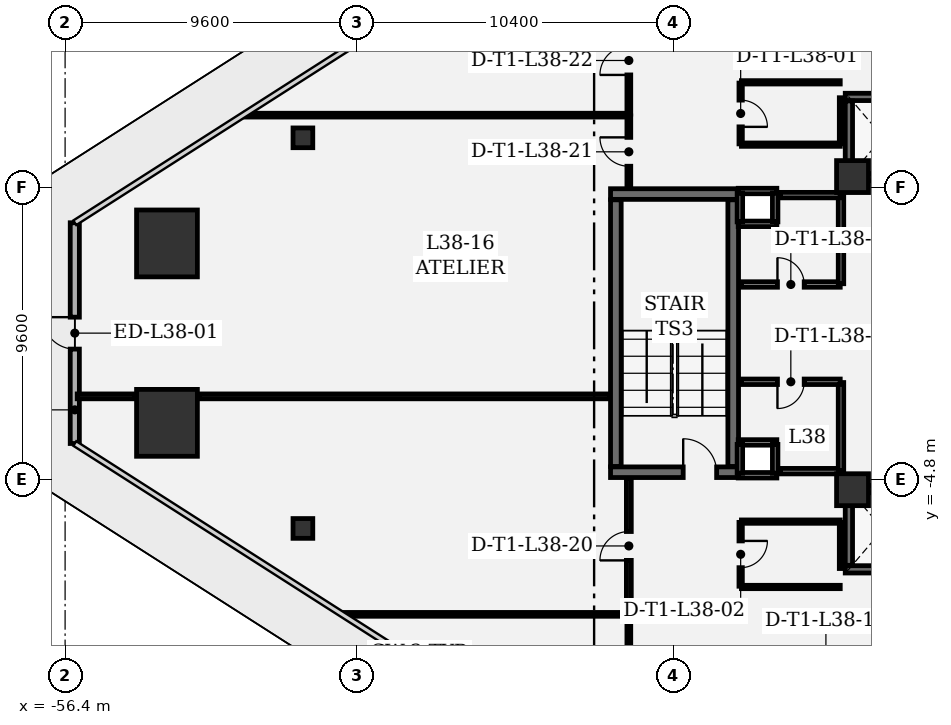
"""IFC4 building model, lengths in metres.
Left out: names, types, materials, properties, quantities, classifications, styles, units other than length and angle.
Written with IfcOpenShell. Run it as: python <this file> out.ifc"""

import sys

from ifc_helpers import new_model, si_unit, direction, frame, frame_2d, origin, origin_2d, place, context, subcontext, project, spatial, rectangle, extrude, element, fill, save


model = new_model("IFC4")
c1 = context("Model", 3, precision=1e-05, world=origin(), true_north=direction((0.0, 1.0)))
c2 = subcontext(c1, "Body", "Model", "MODEL_VIEW")
j1 = project(units=[si_unit("LENGTHUNIT", "METRE"), si_unit("PLANEANGLEUNIT", "RADIAN")], contexts=[c1])
p1 = place(None, origin())
s1 = spatial("IfcSite", under=j1, at=p1, CompositionType="ELEMENT")
p2 = place(p1, origin())
s2 = spatial("IfcBuilding", under=s1, at=p2, CompositionType="ELEMENT")
p3 = place(p2, frame((0.0, 0.0, 166.5)))
s3 = spatial("IfcBuildingStorey", under=s2, at=p3, CompositionType="ELEMENT", Elevation=166.5)
for number, where, z_axis, x_axis in (
    (1, (-53.049, 2.951, 0.0), (0.0, 0.0, 1.0), (1.0, 0.0, 0.0)),
    (2, (-53.049, -2.951, 0.0), (0.0, 0.0, 1.0), (1.0, 0.0, 0.0)),
):
    element("IfcColumn", number, at=place(p3, frame(where, z_axis=z_axis, x_axis=x_axis)), inside=s3, PredefinedType="COLUMN", context=c2, shape_type="SweptSolid", body=[
        extrude(rectangle(XDim=2.0, YDim=2.2, at=origin_2d()), origin(), (0.0, 0.0, 1.0), 4.05),
    ])
for number, where, z_axis, x_axis in (
    (3, (-30.5, 5.15, 0.0), (0.0, 0.0, 1.0), (1.0, 0.0, 0.0)),
    (4, (-30.5, -5.15, 0.0), (0.0, 0.0, 1.0), (1.0, 0.0, 0.0)),
):
    element("IfcColumn", number, at=place(p3, frame(where, z_axis=z_axis, x_axis=x_axis)), inside=s3, PredefinedType="COLUMN", context=c2, shape_type="SweptSolid", body=[
        extrude(rectangle(XDim=1.05, YDim=1.05, at=origin_2d()), origin(), (0.0, 0.0, 1.0), 4.05),
    ])
for number, where, z_axis, x_axis in (
    (5, (-48.578, 6.425, 0.0), (0.0, 0.0, 1.0), (1.0, 0.0, 0.0)),
    (6, (-48.578, -6.425, 0.0), (0.0, 0.0, 1.0), (1.0, 0.0, 0.0)),
):
    element("IfcColumn", number, at=place(p3, frame(where, z_axis=z_axis, x_axis=x_axis)), inside=s3, PredefinedType="COLUMN", context=c2, shape_type="SweptSolid", body=[
        extrude(rectangle(XDim=0.65, YDim=0.65, at=origin_2d()), origin(), (0.0, 0.0, 1.0), 4.05),
    ])
p4 = place(p3, frame((-56.081, -3.631, 0.0), z_axis=(0.0, 0.0, 1.0), x_axis=(0.0, 1.0, 0.0)))
e7 = element("IfcWall", 7, at=p4, inside=s3, PredefinedType="SOLIDWALL", context=c2, shape_type="SweptSolid", body=[
    extrude(rectangle(XDim=7.261, YDim=0.3, at=frame_2d((3.631, 0.0))), origin(), (0.0, 0.0, 1.0), 3.78),
])
p5 = place(p4, frame((3.106, 0.0, 0.0)))
e8 = element("IfcOpeningElement", 8, at=p5, cuts=e7, PredefinedType="OPENING", context=c2, shape_type="SweptSolid", body=[
    extrude(rectangle(XDim=1.05, YDim=2.2, at=frame_2d((0.525, 1.1))), frame((0.0, 0.16, 0.0), z_axis=(0.0, -1.0, 0.0), x_axis=(1.0, 0.0, 0.0)), (0.0, 0.0, 1.0), 0.32),
])
p6 = place(p3, frame((-38.46, -4.575, 0.0), z_axis=(0.0, 0.0, 1.0), x_axis=(1.0, 0.0, 0.0)))
e9 = element("IfcWall", 9, at=p6, inside=s3, PredefinedType="SHEAR", context=c2, shape_type="SweptSolid", body=[
    extrude(rectangle(XDim=4.21, YDim=0.35, at=frame_2d((2.105, 0.0))), origin(), (0.0, 0.0, 1.0), 3.78),
])
p7 = place(p6, frame((2.39, 0.0, 0.0)))
e10 = element("IfcOpeningElement", 10, at=p7, cuts=e9, PredefinedType="OPENING", context=c2, shape_type="SweptSolid", body=[
    extrude(rectangle(XDim=1.1, YDim=2.2, at=frame_2d((0.55, 1.1))), frame((0.0, 0.185, 0.0), z_axis=(0.0, -1.0, 0.0), x_axis=(1.0, 0.0, 0.0)), (0.0, 0.0, 1.0), 0.37),
])
p8 = place(p3, frame((-34.25, 4.575, 0.0), z_axis=(0.0, 0.0, 1.0), x_axis=(-1.0, 0.0, 0.0)))
e11 = element("IfcWall", 11, at=p8, inside=s3, PredefinedType="SHEAR", context=c2, shape_type="SweptSolid", body=[
    extrude(rectangle(XDim=4.21, YDim=0.35, at=frame_2d((2.105, 0.0))), origin(), (0.0, 0.0, 1.0), 3.78),
])
for number, where, z_axis, x_axis in (
    (12, (-34.425, -4.385, 0.0), (0.0, 0.0, 1.0), (0.0, 1.0, 0.0)),
    (13, (-38.285, 4.385, 0.0), (0.0, 0.0, 1.0), (0.0, -1.0, 0.0)),
):
    element("IfcWall", number, at=place(p3, frame(where, z_axis=z_axis, x_axis=x_axis)), inside=s3, PredefinedType="SHEAR", context=c2, shape_type="SweptSolid", body=[
        extrude(rectangle(XDim=8.77, YDim=0.35, at=frame_2d((4.385, 0.0))), origin(), (0.0, 0.0, 1.0), 3.78),
    ])
for number, where, z_axis, x_axis in (
    (14, (-28.26, 5.13, 0.0), (0.0, 0.0, 1.0), (-1.0, 0.0, 0.0)),
    (15, (-30.74, 7.77, 0.0), (0.0, 0.0, 1.0), (1.0, 0.0, 0.0)),
):
    element("IfcWall", number, at=place(p3, frame(where, z_axis=z_axis, x_axis=x_axis)), inside=s3, PredefinedType="SHEAR", context=c2, shape_type="SweptSolid", body=[
        extrude(rectangle(XDim=2.48, YDim=0.24, at=frame_2d((1.24, 0.0))), origin(), (0.0, 0.0, 1.0), 3.78),
    ])
p9 = place(p3, frame((-30.62, 5.262, 0.0), z_axis=(0.0, 0.0, 1.0), x_axis=(0.0, 1.0, 0.0)))
e16 = element("IfcWall", 16, at=p9, inside=s3, PredefinedType="SHEAR", context=c2, shape_type="SweptSolid", body=[
    extrude(rectangle(XDim=2.376, YDim=0.24, at=frame_2d((1.188, 0.0))), origin(), (0.0, 0.0, 1.0), 3.78),
])
for number, where, z_axis, x_axis in (
    (17, (-28.26, -7.77, 0.0), (0.0, 0.0, 1.0), (-1.0, 0.0, 0.0)),
    (18, (-30.74, -5.13, 0.0), (0.0, 0.0, 1.0), (1.0, 0.0, 0.0)),
):
    element("IfcWall", number, at=place(p3, frame(where, z_axis=z_axis, x_axis=x_axis)), inside=s3, PredefinedType="SHEAR", context=c2, shape_type="SweptSolid", body=[
        extrude(rectangle(XDim=2.48, YDim=0.24, at=frame_2d((1.24, 0.0))), origin(), (0.0, 0.0, 1.0), 3.78),
    ])
p10 = place(p3, frame((-30.62, -7.638, 0.0), z_axis=(0.0, 0.0, 1.0), x_axis=(0.0, 1.0, 0.0)))
e19 = element("IfcWall", 19, at=p10, inside=s3, PredefinedType="SHEAR", context=c2, shape_type="SweptSolid", body=[
    extrude(rectangle(XDim=2.376, YDim=0.24, at=frame_2d((1.188, 0.0))), origin(), (0.0, 0.0, 1.0), 3.78),
])
for number, where, z_axis, x_axis in (
    (20, (-32.99, 3.595, 0.0), (0.0, 0.0, 1.0), (-1.0, 0.0, 0.0)),
    (21, (-34.26, 4.675, 0.0), (0.0, 0.0, 1.0), (1.0, 0.0, 0.0)),
):
    element("IfcWall", number, at=place(p3, frame(where, z_axis=z_axis, x_axis=x_axis)), inside=s3, PredefinedType="PARTITIONING", context=c2, shape_type="SweptSolid", body=[
        extrude(rectangle(XDim=1.27, YDim=0.18, at=frame_2d((0.635, 0.0))), origin(), (0.0, 0.0, 1.0), 3.78),
    ])
for number, where, z_axis, x_axis in (
    (22, (-34.205, 3.66, 0.0), (0.0, 0.0, 1.0), (0.0, 1.0, 0.0)),
    (23, (-33.045, 4.61, 0.0), (0.0, 0.0, 1.0), (0.0, -1.0, 0.0)),
):
    element("IfcWall", number, at=place(p3, frame(where, z_axis=z_axis, x_axis=x_axis)), inside=s3, PredefinedType="PARTITIONING", context=c2, shape_type="SweptSolid", body=[
        extrude(rectangle(XDim=0.95, YDim=0.18, at=frame_2d((0.475, 0.0))), origin(), (0.0, 0.0, 1.0), 3.78),
    ])
for number, where, z_axis, x_axis in (
    (24, (-32.99, -4.675, 0.0), (0.0, 0.0, 1.0), (-1.0, 0.0, 0.0)),
    (25, (-34.26, -3.595, 0.0), (0.0, 0.0, 1.0), (1.0, 0.0, 0.0)),
):
    element("IfcWall", number, at=place(p3, frame(where, z_axis=z_axis, x_axis=x_axis)), inside=s3, PredefinedType="PARTITIONING", context=c2, shape_type="SweptSolid", body=[
        extrude(rectangle(XDim=1.27, YDim=0.18, at=frame_2d((0.635, 0.0))), origin(), (0.0, 0.0, 1.0), 3.78),
    ])
for number, where, z_axis, x_axis in (
    (26, (-34.205, -4.61, 0.0), (0.0, 0.0, 1.0), (0.0, 1.0, 0.0)),
    (27, (-33.045, -3.66, 0.0), (0.0, 0.0, 1.0), (0.0, -1.0, 0.0)),
):
    element("IfcWall", number, at=place(p3, frame(where, z_axis=z_axis, x_axis=x_axis)), inside=s3, PredefinedType="PARTITIONING", context=c2, shape_type="SweptSolid", body=[
        extrude(rectangle(XDim=0.95, YDim=0.18, at=frame_2d((0.475, 0.0))), origin(), (0.0, 0.0, 1.0), 3.78),
    ])
p11 = place(p3, frame((-34.18, 8.225, 0.0), z_axis=(0.0, 0.0, 1.0), x_axis=(0.0, -1.0, 0.0)))
e28 = element("IfcWall", 28, at=p11, inside=s3, PredefinedType="PARTITIONING", context=c2, shape_type="SweptSolid", body=[
    extrude(rectangle(XDim=2.0, YDim=0.11, at=frame_2d((1.0, 0.0))), origin(), (0.0, 0.0, 1.0), 3.78),
])
p12 = place(p11, frame((0.56, 0.0, 0.0)))
e29 = element("IfcOpeningElement", 29, at=p12, cuts=e28, PredefinedType="OPENING", context=c2, shape_type="SweptSolid", body=[
    extrude(rectangle(XDim=0.88, YDim=2.1, at=frame_2d((0.44, 1.05))), frame((0.0, 0.065, 0.0), z_axis=(0.0, -1.0, 0.0), x_axis=(1.0, 0.0, 0.0)), (0.0, 0.0, 1.0), 0.13),
])
p13 = place(p3, frame((-34.155, 6.2, 0.0), z_axis=(0.0, 0.0, 1.0), x_axis=(1.0, 0.0, 0.0)))
e30 = element("IfcWall", 30, at=p13, inside=s3, PredefinedType="PARTITIONING", context=c2, shape_type="SweptSolid", body=[
    extrude(rectangle(XDim=3.25, YDim=0.11, at=frame_2d((1.625, 0.0))), origin(), (0.0, 0.0, 1.0), 3.344),
])
p14 = place(p3, frame((-30.88, 6.225, 0.0), z_axis=(0.0, 0.0, 1.0), x_axis=(0.0, 1.0, 0.0)))
e31 = element("IfcWall", 31, at=p14, inside=s3, PredefinedType="PARTITIONING", context=c2, shape_type="SweptSolid", body=[
    extrude(rectangle(XDim=1.518, YDim=0.11, at=frame_2d((0.759, 0.0))), origin(), (0.0, 0.0, 1.0), 3.78),
])
p15 = place(p3, frame((-30.905, 8.25, 0.0), z_axis=(0.0, 0.0, 1.0), x_axis=(-1.0, 0.0, 0.0)))
e32 = element("IfcWall", 32, at=p15, inside=s3, PredefinedType="PARTITIONING", context=c2, shape_type="SweptSolid", body=[
    extrude(rectangle(XDim=3.25, YDim=0.11, at=frame_2d((1.625, 0.0))), origin(), (0.0, 0.0, 1.0), 3.78),
])
p16 = place(p3, frame((-34.18, -6.225, 0.0), z_axis=(0.0, 0.0, 1.0), x_axis=(0.0, -1.0, 0.0)))
e33 = element("IfcWall", 33, at=p16, inside=s3, PredefinedType="PARTITIONING", context=c2, shape_type="SweptSolid", body=[
    extrude(rectangle(XDim=2.1, YDim=0.11, at=frame_2d((1.05, 0.0))), origin(), (0.0, 0.0, 1.0), 3.78),
])
p17 = place(p16, frame((0.61, 0.0, 0.0)))
e34 = element("IfcOpeningElement", 34, at=p17, cuts=e33, PredefinedType="OPENING", context=c2, shape_type="SweptSolid", body=[
    extrude(rectangle(XDim=0.88, YDim=2.1, at=frame_2d((0.44, 1.05))), frame((0.0, 0.065, 0.0), z_axis=(0.0, -1.0, 0.0), x_axis=(1.0, 0.0, 0.0)), (0.0, 0.0, 1.0), 0.13),
])
p18 = place(p3, frame((-34.155, -8.35, 0.0), z_axis=(0.0, 0.0, 1.0), x_axis=(1.0, 0.0, 0.0)))
e35 = element("IfcWall", 35, at=p18, inside=s3, PredefinedType="PARTITIONING", context=c2, shape_type="SweptSolid", body=[
    extrude(rectangle(XDim=3.25, YDim=0.11, at=frame_2d((1.625, 0.0))), origin(), (0.0, 0.0, 1.0), 3.78),
])
p19 = place(p3, frame((-30.88, -7.743, 0.0), z_axis=(0.0, 0.0, 1.0), x_axis=(0.0, 1.0, 0.0)))
e36 = element("IfcWall", 36, at=p19, inside=s3, PredefinedType="PARTITIONING", context=c2, shape_type="SweptSolid", body=[
    extrude(rectangle(XDim=1.518, YDim=0.11, at=frame_2d((0.759, 0.0))), origin(), (0.0, 0.0, 1.0), 3.78),
])
p20 = place(p3, frame((-30.905, -6.2, 0.0), z_axis=(0.0, 0.0, 1.0), x_axis=(-1.0, 0.0, 0.0)))
e37 = element("IfcWall", 37, at=p20, inside=s3, PredefinedType="PARTITIONING", context=c2, shape_type="SweptSolid", body=[
    extrude(rectangle(XDim=3.25, YDim=0.11, at=frame_2d((1.625, 0.0))), origin(), (0.0, 0.0, 1.0), 3.344),
])
p21 = place(p3, frame((-34.155, 1.6, 0.0), z_axis=(0.0, 0.0, 1.0), x_axis=(1.0, 0.0, 0.0)))
e38 = element("IfcWall", 38, at=p21, inside=s3, PredefinedType="PARTITIONING", context=c2, shape_type="SweptSolid", body=[
    extrude(rectangle(XDim=3.25, YDim=0.18, at=frame_2d((1.625, 0.0))), origin(), (0.0, 0.0, 1.0), 3.78),
])
p22 = place(p21, frame((1.185, 0.0, 0.0)))
e39 = element("IfcOpeningElement", 39, at=p22, cuts=e38, PredefinedType="OPENING", context=c2, shape_type="SweptSolid", body=[
    extrude(rectangle(XDim=0.88, YDim=2.1, at=frame_2d((0.44, 1.05))), frame((0.0, 0.1, 0.0), z_axis=(0.0, -1.0, 0.0), x_axis=(1.0, 0.0, 0.0)), (0.0, 0.0, 1.0), 0.2),
])
p23 = place(p3, frame((-30.88, 1.625, 0.0), z_axis=(0.0, 0.0, 1.0), x_axis=(0.0, 1.0, 0.0)))
e40 = element("IfcWall", 40, at=p23, inside=s3, PredefinedType="PARTITIONING", context=c2, shape_type="SweptSolid", body=[
    extrude(rectangle(XDim=2.89, YDim=0.18, at=frame_2d((1.445, 0.0))), origin(), (0.0, 0.0, 1.0), 3.78),
])
for number, where, z_axis, x_axis in (
    (41, (-30.905, 4.54, 0.0), (0.0, 0.0, 1.0), (-1.0, 0.0, 0.0)),
    (42, (-32.88, -4.54, 0.0), (0.0, 0.0, 1.0), (1.0, 0.0, 0.0)),
):
    element("IfcWall", number, at=place(p3, frame(where, z_axis=z_axis, x_axis=x_axis)), inside=s3, PredefinedType="PARTITIONING", context=c2, shape_type="SweptSolid", body=[
        extrude(rectangle(XDim=1.975, YDim=0.18, at=frame_2d((0.988, 0.0))), origin(), (0.0, 0.0, 1.0), 3.78),
    ])
p24 = place(p3, frame((-30.88, -4.515, 0.0), z_axis=(0.0, 0.0, 1.0), x_axis=(0.0, 1.0, 0.0)))
e43 = element("IfcWall", 43, at=p24, inside=s3, PredefinedType="PARTITIONING", context=c2, shape_type="SweptSolid", body=[
    extrude(rectangle(XDim=2.89, YDim=0.18, at=frame_2d((1.445, 0.0))), origin(), (0.0, 0.0, 1.0), 3.78),
])
p25 = place(p3, frame((-30.905, -1.6, 0.0), z_axis=(0.0, 0.0, 1.0), x_axis=(-1.0, 0.0, 0.0)))
e44 = element("IfcWall", 44, at=p25, inside=s3, PredefinedType="PARTITIONING", context=c2, shape_type="SweptSolid", body=[
    extrude(rectangle(XDim=3.25, YDim=0.18, at=frame_2d((1.625, 0.0))), origin(), (0.0, 0.0, 1.0), 3.78),
])
p26 = place(p25, frame((1.185, 0.0, 0.0)))
e45 = element("IfcOpeningElement", 45, at=p26, cuts=e44, PredefinedType="OPENING", context=c2, shape_type="SweptSolid", body=[
    extrude(rectangle(XDim=0.88, YDim=2.1, at=frame_2d((0.44, 1.05))), frame((0.0, 0.1, 0.0), z_axis=(0.0, -1.0, 0.0), x_axis=(1.0, 0.0, 0.0)), (0.0, 0.0, 1.0), 0.2),
])
p27 = place(p3, frame((-37.858, -10.933, 0.0), z_axis=(0.0, 0.0, 1.0), x_axis=(0.0, 1.0, 0.0)))
e46 = element("IfcWall", 46, at=p27, inside=s3, PredefinedType="PARTITIONING", context=c2, shape_type="SweptSolid", body=[
    extrude(rectangle(XDim=1.658, YDim=0.125, at=frame_2d((0.829, 0.0))), origin(), (0.0, 0.0, 1.0), 3.78),
])
p28 = place(p3, frame((-37.883, -9.25, 0.0), z_axis=(0.0, 0.0, 1.0), x_axis=(-1.0, 0.0, 0.0)))
e47 = element("IfcWall", 47, at=p28, inside=s3, PredefinedType="PARTITIONING", context=c2, shape_type="SweptSolid", body=[
    extrude(rectangle(XDim=9.325, YDim=0.125, at=frame_2d((4.663, 0.0))), origin(), (0.0, 0.0, 1.0), 2.9),
])
p29 = place(p3, frame((-37.858, -9.217, 0.0), z_axis=(0.0, 0.0, 1.0), x_axis=(0.0, 1.0, 0.0)))
e48 = element("IfcWall", 48, at=p29, inside=s3, PredefinedType="PARTITIONING", context=c2, shape_type="SweptSolid", body=[
    extrude(rectangle(XDim=4.434, YDim=0.16, at=frame_2d((2.217, 0.0))), origin(), (0.0, 0.0, 1.0), 3.78),
])
p30 = place(p29, frame((1.742, 0.0, 0.0)))
e49 = element("IfcOpeningElement", 49, at=p30, cuts=e48, PredefinedType="OPENING", context=c2, shape_type="SweptSolid", body=[
    extrude(rectangle(XDim=0.95, YDim=2.15, at=frame_2d((0.475, 1.075))), frame((0.0, 0.09, 0.0), z_axis=(0.0, -1.0, 0.0), x_axis=(1.0, 0.0, 0.0)), (0.0, 0.0, 1.0), 0.18),
])
p31 = place(p3, frame((-38.493, -2.08, 0.0), z_axis=(0.0, 0.0, 1.0), x_axis=(-1.0, 0.0, 0.0)))
e50 = element("IfcWall", 50, at=p31, inside=s3, PredefinedType="PARTITIONING", context=c2, shape_type="SweptSolid", body=[
    extrude(rectangle(XDim=13.491, YDim=0.16, at=frame_2d((6.746, 0.0))), origin(), (0.0, 0.0, 1.0), 3.78),
])
p32 = place(p3, frame((-54.115, -2.08, 0.0), z_axis=(0.0, 0.0, 1.0), x_axis=(-1.0, 0.0, 0.0)))
e51 = element("IfcWall", 51, at=p32, inside=s3, PredefinedType="PARTITIONING", context=c2, shape_type="SweptSolid", body=[
    extrude(rectangle(XDim=1.887, YDim=0.16, at=frame_2d((0.943, 0.0))), origin(), (0.0, 0.0, 1.0), 3.78),
])
p33 = place(p3, frame((-37.858, 4.783, 0.0), z_axis=(0.0, 0.0, 1.0), x_axis=(0.0, 1.0, 0.0)))
e52 = element("IfcWall", 52, at=p33, inside=s3, PredefinedType="PARTITIONING", context=c2, shape_type="SweptSolid", body=[
    extrude(rectangle(XDim=2.362, YDim=0.125, at=frame_2d((1.181, 0.0))), origin(), (0.0, 0.0, 1.0), 3.78),
])
p34 = place(p33, frame((0.706, 0.0, 0.0)))
e53 = element("IfcOpeningElement", 53, at=p34, cuts=e52, PredefinedType="OPENING", context=c2, shape_type="SweptSolid", body=[
    extrude(rectangle(XDim=0.95, YDim=2.15, at=frame_2d((0.475, 1.075))), frame((0.0, 0.073, 0.0), z_axis=(0.0, -1.0, 0.0), x_axis=(1.0, 0.0, 0.0)), (0.0, 0.0, 1.0), 0.145),
])
p35 = place(p3, frame((-37.883, 7.17, 0.0), z_axis=(0.0, 0.0, 1.0), x_axis=(-1.0, 0.0, 0.0)))
e54 = element("IfcWall", 54, at=p35, inside=s3, PredefinedType="PARTITIONING", context=c2, shape_type="SweptSolid", body=[
    extrude(rectangle(XDim=12.58, YDim=0.125, at=frame_2d((6.29, 0.0))), origin(), (0.0, 0.0, 1.0), 2.9),
])
p36 = place(p3, frame((-37.858, 7.204, 0.0), z_axis=(0.0, 0.0, 1.0), x_axis=(0.0, 1.0, 0.0)))
e55 = element("IfcWall", 55, at=p36, inside=s3, PredefinedType="PARTITIONING", context=c2, shape_type="SweptSolid", body=[
    extrude(rectangle(XDim=3.53, YDim=0.125, at=frame_2d((1.765, 0.0))), origin(), (0.0, 0.0, 1.0), 3.78),
])
p37 = place(p36, frame((1.29, 0.0, 0.0)))
e56 = element("IfcOpeningElement", 56, at=p37, cuts=e55, PredefinedType="OPENING", context=c2, shape_type="SweptSolid", body=[
    extrude(rectangle(XDim=0.95, YDim=2.15, at=frame_2d((0.475, 1.075))), frame((0.0, 0.073, 0.0), z_axis=(0.0, -1.0, 0.0), x_axis=(1.0, 0.0, 0.0)), (0.0, 0.0, 1.0), 0.145),
])
p38 = place(p5, origin())
e57 = element("IfcDoor", 57, at=p38, inside=s3, OperationType="SINGLE_SWING_RIGHT", PredefinedType="DOOR", context=c2, shape_type="SweptSolid", body=[
    extrude(rectangle(XDim=1.05, YDim=2.2, at=frame_2d((0.525, 1.1))), frame((0.0, 0.025, 0.0), z_axis=(0.0, -1.0, 0.0), x_axis=(1.0, 0.0, 0.0)), (0.0, 0.0, 1.0), 0.05),
])
fill(e8, e57)
p39 = place(p7, origin())
e58 = element("IfcDoor", 58, at=p39, inside=s3, OperationType="SINGLE_SWING_LEFT", PredefinedType="DOOR", context=c2, shape_type="SweptSolid", body=[
    extrude(rectangle(XDim=1.1, YDim=2.2, at=frame_2d((0.55, 1.1))), frame((0.0, 0.025, 0.0), z_axis=(0.0, -1.0, 0.0), x_axis=(1.0, 0.0, 0.0)), (0.0, 0.0, 1.0), 0.05),
])
fill(e10, e58)
p40 = place(p12, origin())
e59 = element("IfcDoor", 59, at=p40, inside=s3, OperationType="SINGLE_SWING_RIGHT", PredefinedType="DOOR", context=c2, shape_type="SweptSolid", body=[
    extrude(rectangle(XDim=0.88, YDim=2.1, at=frame_2d((0.44, 1.05))), frame((0.0, 0.025, 0.0), z_axis=(0.0, -1.0, 0.0), x_axis=(1.0, 0.0, 0.0)), (0.0, 0.0, 1.0), 0.05),
])
fill(e29, e59)
p41 = place(p17, origin())
e60 = element("IfcDoor", 60, at=p41, inside=s3, OperationType="SINGLE_SWING_LEFT", PredefinedType="DOOR", context=c2, shape_type="SweptSolid", body=[
    extrude(rectangle(XDim=0.88, YDim=2.1, at=frame_2d((0.44, 1.05))), frame((0.0, 0.025, 0.0), z_axis=(0.0, -1.0, 0.0), x_axis=(1.0, 0.0, 0.0)), (0.0, 0.0, 1.0), 0.05),
])
fill(e34, e60)
p42 = place(p22, origin())
e61 = element("IfcDoor", 61, at=p42, inside=s3, OperationType="SINGLE_SWING_LEFT", PredefinedType="DOOR", context=c2, shape_type="SweptSolid", body=[
    extrude(rectangle(XDim=0.88, YDim=2.1, at=frame_2d((0.44, 1.05))), frame((0.0, 0.025, 0.0), z_axis=(0.0, -1.0, 0.0), x_axis=(1.0, 0.0, 0.0)), (0.0, 0.0, 1.0), 0.05),
])
fill(e39, e61)
p43 = place(p26, origin())
e62 = element("IfcDoor", 62, at=p43, inside=s3, OperationType="SINGLE_SWING_RIGHT", PredefinedType="DOOR", context=c2, shape_type="SweptSolid", body=[
    extrude(rectangle(XDim=0.88, YDim=2.1, at=frame_2d((0.44, 1.05))), frame((0.0, 0.025, 0.0), z_axis=(0.0, -1.0, 0.0), x_axis=(1.0, 0.0, 0.0)), (0.0, 0.0, 1.0), 0.05),
])
fill(e45, e62)
p44 = place(p30, origin())
e63 = element("IfcDoor", 63, at=p44, inside=s3, OperationType="SINGLE_SWING_LEFT", PredefinedType="DOOR", context=c2, shape_type="SweptSolid", body=[
    extrude(rectangle(XDim=0.95, YDim=2.15, at=frame_2d((0.475, 1.075))), frame((0.0, 0.025, 0.0), z_axis=(0.0, -1.0, 0.0), x_axis=(1.0, 0.0, 0.0)), (0.0, 0.0, 1.0), 0.05),
])
fill(e49, e63)
p45 = place(p34, origin())
e64 = element("IfcDoor", 64, at=p45, inside=s3, OperationType="SINGLE_SWING_RIGHT", PredefinedType="DOOR", context=c2, shape_type="SweptSolid", body=[
    extrude(rectangle(XDim=0.95, YDim=2.15, at=frame_2d((0.475, 1.075))), frame((0.0, 0.025, 0.0), z_axis=(0.0, -1.0, 0.0), x_axis=(1.0, 0.0, 0.0)), (0.0, 0.0, 1.0), 0.05),
])
fill(e53, e64)
p46 = place(p37, origin())
e65 = element("IfcDoor", 65, at=p46, inside=s3, OperationType="SINGLE_SWING_LEFT", PredefinedType="DOOR", context=c2, shape_type="SweptSolid", body=[
    extrude(rectangle(XDim=0.95, YDim=2.15, at=frame_2d((0.475, 1.075))), frame((0.0, 0.025, 0.0), z_axis=(0.0, -1.0, 0.0), x_axis=(1.0, 0.0, 0.0)), (0.0, 0.0, 1.0), 0.05),
])
fill(e56, e65)
save(model, sys.argv[1])
